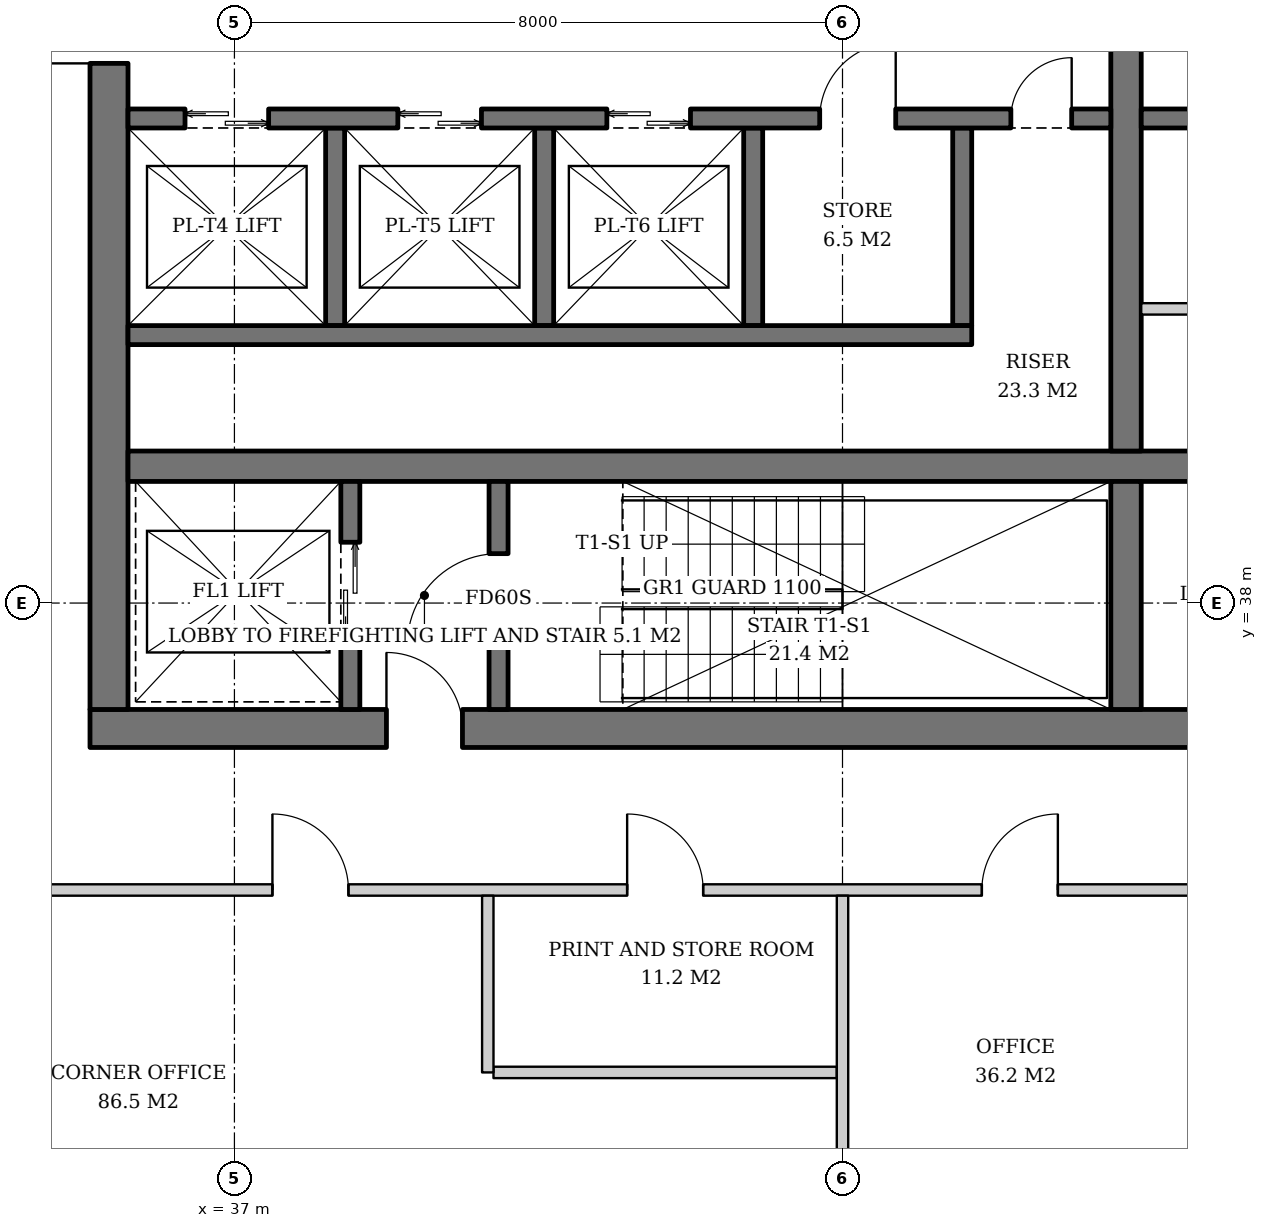
"""IFC4 building model, lengths in metres.
Left out: names, types, materials, properties, quantities, classifications, styles, units other than length and angle.
Written with IfcOpenShell. Run it as: python <this file> out.ifc"""

import sys

from ifc_helpers import new_model, si_unit, direction, frame, frame_2d, origin, place, context, subcontext, project, spatial, rectangle, extrude, element, fill, save


model = new_model("IFC4")
c1 = context("Model", 3, precision=1e-05, world=origin(), true_north=direction((0.0, 1.0)))
c2 = subcontext(c1, "Body", "Model", "MODEL_VIEW")
j1 = project(units=[si_unit("LENGTHUNIT", "METRE"), si_unit("PLANEANGLEUNIT", "RADIAN")], contexts=[c1])
p1 = place(None, origin())
s1 = spatial("IfcSite", under=j1, at=p1, CompositionType="ELEMENT")
p2 = place(p1, origin())
s2 = spatial("IfcBuilding", under=s1, at=p2, CompositionType="ELEMENT")
p3 = place(p2, frame((0.0, 0.0, 271.8)))
s3 = spatial("IfcBuildingStorey", under=s2, at=p3, CompositionType="ELEMENT", Elevation=271.8)
p4 = place(p3, frame((35.1, 36.35, 0.0), z_axis=(0.0, 0.0, 1.0), x_axis=(1.0, 0.0, 0.0)))
e1 = element("IfcWall", 1, at=p4, inside=s3, PredefinedType="SHEAR", context=c2, shape_type="SweptSolid", body=[
    extrude(rectangle(XDim=19.8, YDim=0.5, at=frame_2d((9.9, 0.0))), origin(), (0.0, 0.0, 1.0), 3.8),
])
p5 = place(p4, frame((3.9, 0.0, 0.0)))
e2 = element("IfcOpeningElement", 2, at=p5, cuts=e1, PredefinedType="OPENING", context=c2, shape_type="SweptSolid", body=[
    extrude(rectangle(XDim=1.0, YDim=2.1, at=frame_2d((0.5, 1.05))), frame((0.0, 0.26, 0.0), z_axis=(0.0, -1.0, 0.0), x_axis=(1.0, 0.0, 0.0)), (0.0, 0.0, 1.0), 0.52),
])
p6 = place(p4, frame((15.35, 0.0, 0.0)))
e3 = element("IfcOpeningElement", 3, at=p6, cuts=e1, PredefinedType="OPENING", context=c2, shape_type="SweptSolid", body=[
    extrude(rectangle(XDim=1.0, YDim=2.1, at=frame_2d((0.5, 1.05))), frame((0.0, 0.26, 0.0), z_axis=(0.0, -1.0, 0.0), x_axis=(1.0, 0.0, 0.0)), (0.0, 0.0, 1.0), 0.52),
])
p7 = place(p3, frame((35.35, 36.6, 0.0), z_axis=(0.0, 0.0, 1.0), x_axis=(0.0, 1.0, 0.0)))
e4 = element("IfcWall", 4, at=p7, inside=s3, PredefinedType="SHEAR", context=c2, shape_type="SweptSolid", body=[
    extrude(rectangle(XDim=18.8, YDim=0.5, at=frame_2d((9.4, 0.0))), origin(), (0.0, 0.0, 1.0), 3.8),
])
p8 = place(p7, frame((8.5, 0.0, 0.0)))
e5 = element("IfcOpeningElement", 5, at=p8, cuts=e4, PredefinedType="OPENING", context=c2, shape_type="SweptSolid", body=[
    extrude(rectangle(XDim=1.8, YDim=2.4, at=frame_2d((0.9, 1.2))), frame((0.0, 0.26, 0.0), z_axis=(0.0, -1.0, 0.0), x_axis=(1.0, 0.0, 0.0)), (0.0, 0.0, 1.0), 0.52),
])
p9 = place(p3, frame((35.6, 39.8, 0.0), z_axis=(0.0, 0.0, 1.0), x_axis=(1.0, 0.0, 0.0)))
e6 = element("IfcWall", 6, at=p9, inside=s3, PredefinedType="SHEAR", context=c2, shape_type="SweptSolid", body=[
    extrude(rectangle(XDim=18.8, YDim=0.4, at=frame_2d((9.4, 0.0))), origin(), (0.0, 0.0, 1.0), 3.8),
])
p10 = place(p3, frame((48.73, 36.6, 0.0), z_axis=(0.0, 0.0, 1.0), x_axis=(0.0, 1.0, 0.0)))
e7 = element("IfcWall", 7, at=p10, inside=s3, PredefinedType="SHEAR", context=c2, shape_type="SweptSolid", body=[
    extrude(rectangle(XDim=3.0, YDim=0.4, at=frame_2d((1.5, 0.0))), origin(), (0.0, 0.0, 1.0), 3.8),
])
p11 = place(p3, frame((48.73, 40.0, 0.0), z_axis=(0.0, 0.0, 1.0), x_axis=(0.0, 1.0, 0.0)))
e8 = element("IfcWall", 8, at=p11, inside=s3, PredefinedType="SHEAR", context=c2, shape_type="SweptSolid", body=[
    extrude(rectangle(XDim=12.0, YDim=0.4, at=frame_2d((6.0, 0.0))), origin(), (0.0, 0.0, 1.0), 3.8),
])
p12 = place(p3, frame((38.525, 36.6, 0.0), z_axis=(0.0, 0.0, 1.0), x_axis=(0.0, 1.0, 0.0)))
e9 = element("IfcWall", 9, at=p12, inside=s3, PredefinedType="SHEAR", context=c2, shape_type="SweptSolid", body=[
    extrude(rectangle(XDim=3.0, YDim=0.25, at=frame_2d((1.5, 0.0))), origin(), (0.0, 0.0, 1.0), 3.8),
])
p13 = place(p12, frame((0.9, 0.0, 0.0)))
e10 = element("IfcOpeningElement", 10, at=p13, cuts=e9, PredefinedType="OPENING", context=c2, shape_type="SweptSolid", body=[
    extrude(rectangle(XDim=1.3, YDim=2.2, at=frame_2d((0.65, 1.1))), frame((0.0, 0.135, 0.0), z_axis=(0.0, -1.0, 0.0), x_axis=(1.0, 0.0, 0.0)), (0.0, 0.0, 1.0), 0.27),
])
p14 = place(p3, frame((40.475, 36.6, 0.0), z_axis=(0.0, 0.0, 1.0), x_axis=(0.0, 1.0, 0.0)))
e11 = element("IfcWall", 11, at=p14, inside=s3, PredefinedType="SHEAR", context=c2, shape_type="SweptSolid", body=[
    extrude(rectangle(XDim=3.0, YDim=0.25, at=frame_2d((1.5, 0.0))), origin(), (0.0, 0.0, 1.0), 3.8),
])
p15 = place(p14, frame((0.85, 0.0, 0.0)))
e12 = element("IfcOpeningElement", 12, at=p15, cuts=e11, PredefinedType="OPENING", context=c2, shape_type="SweptSolid", body=[
    extrude(rectangle(XDim=1.2, YDim=2.1, at=frame_2d((0.6, 1.05))), frame((0.0, 0.135, 0.0), z_axis=(0.0, -1.0, 0.0), x_axis=(1.0, 0.0, 0.0)), (0.0, 0.0, 1.0), 0.27),
])
for number, where, z_axis, x_axis in (
    (13, (38.325, 44.25, 0.0), (0.0, 0.0, 1.0), (0.0, -1.0, 0.0)),
    (14, (41.075, 44.25, 0.0), (0.0, 0.0, 1.0), (0.0, -1.0, 0.0)),
    (15, (43.825, 44.25, 0.0), (0.0, 0.0, 1.0), (0.0, -1.0, 0.0)),
    (16, (46.575, 44.25, 0.0), (0.0, 0.0, 1.0), (0.0, -1.0, 0.0)),
):
    element("IfcWall", number, at=place(p3, frame(where, z_axis=z_axis, x_axis=x_axis)), inside=s3, PredefinedType="SHEAR", context=c2, shape_type="SweptSolid", body=[
        extrude(rectangle(XDim=2.6, YDim=0.25, at=frame_2d((1.3, 0.0))), origin(), (0.0, 0.0, 1.0), 3.8),
    ])
p16 = place(p3, frame((35.6, 41.525, 0.0), z_axis=(0.0, 0.0, 1.0), x_axis=(1.0, 0.0, 0.0)))
e17 = element("IfcWall", 17, at=p16, inside=s3, PredefinedType="SHEAR", context=c2, shape_type="SweptSolid", body=[
    extrude(rectangle(XDim=11.1, YDim=0.25, at=frame_2d((5.55, 0.0))), origin(), (0.0, 0.0, 1.0), 3.8),
])
p17 = place(p3, frame((35.6, 44.375, 0.0), z_axis=(0.0, 0.0, 1.0), x_axis=(1.0, 0.0, 0.0)))
e18 = element("IfcWall", 18, at=p17, inside=s3, PredefinedType="SHEAR", context=c2, shape_type="SweptSolid", body=[
    extrude(rectangle(XDim=12.93, YDim=0.25, at=frame_2d((6.465, 0.0))), origin(), (0.0, 0.0, 1.0), 3.8),
])
p18 = place(p17, frame((0.75, 0.0, 0.0)))
e19 = element("IfcOpeningElement", 19, at=p18, cuts=e18, PredefinedType="OPENING", context=c2, shape_type="SweptSolid", body=[
    extrude(rectangle(XDim=1.1, YDim=2.2, at=frame_2d((0.55, 1.1))), frame((0.0, 0.135, 0.0), z_axis=(0.0, -1.0, 0.0), x_axis=(1.0, 0.0, 0.0)), (0.0, 0.0, 1.0), 0.27),
])
p19 = place(p17, frame((3.55, 0.0, 0.0)))
e20 = element("IfcOpeningElement", 20, at=p19, cuts=e18, PredefinedType="OPENING", context=c2, shape_type="SweptSolid", body=[
    extrude(rectangle(XDim=1.1, YDim=2.2, at=frame_2d((0.55, 1.1))), frame((0.0, 0.135, 0.0), z_axis=(0.0, -1.0, 0.0), x_axis=(1.0, 0.0, 0.0)), (0.0, 0.0, 1.0), 0.27),
])
p20 = place(p17, frame((6.3, 0.0, 0.0)))
e21 = element("IfcOpeningElement", 21, at=p20, cuts=e18, PredefinedType="OPENING", context=c2, shape_type="SweptSolid", body=[
    extrude(rectangle(XDim=1.1, YDim=2.2, at=frame_2d((0.55, 1.1))), frame((0.0, 0.135, 0.0), z_axis=(0.0, -1.0, 0.0), x_axis=(1.0, 0.0, 0.0)), (0.0, 0.0, 1.0), 0.27),
])
p21 = place(p17, frame((9.1, 0.0, 0.0)))
e22 = element("IfcOpeningElement", 22, at=p21, cuts=e18, PredefinedType="OPENING", context=c2, shape_type="SweptSolid", body=[
    extrude(rectangle(XDim=1.0, YDim=2.1, at=frame_2d((0.5, 1.05))), frame((0.0, 0.135, 0.0), z_axis=(0.0, -1.0, 0.0), x_axis=(1.0, 0.0, 0.0)), (0.0, 0.0, 1.0), 0.27),
])
p22 = place(p17, frame((11.615, 0.0, 0.0)))
e23 = element("IfcOpeningElement", 23, at=p22, cuts=e18, PredefinedType="OPENING", context=c2, shape_type="SweptSolid", body=[
    extrude(rectangle(XDim=0.8, YDim=2.0, at=frame_2d((0.4, 1.0))), frame((0.0, 0.135, 0.0), z_axis=(0.0, -1.0, 0.0), x_axis=(1.0, 0.0, 0.0)), (0.0, 0.0, 1.0), 0.27),
])
p23 = place(p3, frame((48.93, 44.375, 0.0), z_axis=(0.0, 0.0, 1.0), x_axis=(1.0, 0.0, 0.0)))
e24 = element("IfcWall", 24, at=p23, inside=s3, PredefinedType="SHEAR", context=c2, shape_type="SweptSolid", body=[
    extrude(rectangle(XDim=5.47, YDim=0.25, at=frame_2d((2.735, 0.0))), origin(), (0.0, 0.0, 1.0), 3.8),
])
p24 = place(p23, frame((0.78, 0.0, 0.0)))
e25 = element("IfcOpeningElement", 25, at=p24, cuts=e24, PredefinedType="OPENING", context=c2, shape_type="SweptSolid", body=[
    extrude(rectangle(XDim=1.0, YDim=2.1, at=frame_2d((0.5, 1.05))), frame((0.0, 0.135, 0.0), z_axis=(0.0, -1.0, 0.0), x_axis=(1.0, 0.0, 0.0)), (0.0, 0.0, 1.0), 0.27),
])
p25 = place(p23, frame((3.64, 0.0, 0.0)))
e26 = element("IfcOpeningElement", 26, at=p25, cuts=e24, PredefinedType="OPENING", context=c2, shape_type="SweptSolid", body=[
    extrude(rectangle(XDim=1.0, YDim=2.1, at=frame_2d((0.5, 1.05))), frame((0.0, 0.135, 0.0), z_axis=(0.0, -1.0, 0.0), x_axis=(1.0, 0.0, 0.0)), (0.0, 0.0, 1.0), 0.27),
])
p26 = place(p3, frame((48.93, 41.87, 0.0), z_axis=(0.0, 0.0, 1.0), x_axis=(1.0, 0.0, 0.0)))
e27 = element("IfcWall", 27, at=p26, inside=s3, PredefinedType="SOLIDWALL", context=c2, shape_type="SweptSolid", body=[
    extrude(rectangle(XDim=2.56, YDim=0.15, at=frame_2d((1.28, 0.0))), origin(), (0.0, 0.0, 1.0), 3.62),
])
p27 = place(p26, frame((0.78, 0.0, 0.0)))
e28 = element("IfcOpeningElement", 28, at=p27, cuts=e27, PredefinedType="OPENING", context=c2, shape_type="SweptSolid", body=[
    extrude(rectangle(XDim=1.0, YDim=2.1, at=frame_2d((0.5, 1.05))), frame((0.0, 0.085, 0.0), z_axis=(0.0, -1.0, 0.0), x_axis=(1.0, 0.0, 0.0)), (0.0, 0.0, 1.0), 0.17),
])
p28 = place(p3, frame((40.408, 31.825, 0.0), z_axis=(0.0, 0.0, 1.0), x_axis=(1.0, 0.0, 0.0)))
e29 = element("IfcWall", 29, at=p28, inside=s3, PredefinedType="PARTITIONING", context=c2, shape_type="SweptSolid", body=[
    extrude(rectangle(XDim=4.517, YDim=0.15, at=frame_2d((2.258, 0.0))), origin(), (0.0, 0.0, 1.0), 3.12),
])
p29 = place(p3, frame((34.084, 34.225, 0.0), z_axis=(0.0, 0.0, 1.0), x_axis=(1.0, 0.0, 0.0)))
e30 = element("IfcWall", 30, at=p29, inside=s3, PredefinedType="PARTITIONING", context=c2, shape_type="SweptSolid", body=[
    extrude(rectangle(XDim=21.832, YDim=0.15, at=frame_2d((10.916, 0.0))), origin(), (0.0, 0.0, 1.0), 3.02),
])
p30 = place(p29, frame((3.416, 0.0, 0.0)))
e31 = element("IfcOpeningElement", 31, at=p30, cuts=e30, PredefinedType="OPENING", context=c2, shape_type="SweptSolid", body=[
    extrude(rectangle(XDim=1.0, YDim=2.1, at=frame_2d((0.5, 1.05))), frame((0.0, 0.085, 0.0), z_axis=(0.0, -1.0, 0.0), x_axis=(1.0, 0.0, 0.0)), (0.0, 0.0, 1.0), 0.17),
])
p31 = place(p29, frame((8.083, 0.0, 0.0)))
e32 = element("IfcOpeningElement", 32, at=p31, cuts=e30, PredefinedType="OPENING", context=c2, shape_type="SweptSolid", body=[
    extrude(rectangle(XDim=1.0, YDim=2.1, at=frame_2d((0.5, 1.05))), frame((0.0, 0.085, 0.0), z_axis=(0.0, -1.0, 0.0), x_axis=(1.0, 0.0, 0.0)), (0.0, 0.0, 1.0), 0.17),
])
p32 = place(p29, frame((12.749, 0.0, 0.0)))
e33 = element("IfcOpeningElement", 33, at=p32, cuts=e30, PredefinedType="OPENING", context=c2, shape_type="SweptSolid", body=[
    extrude(rectangle(XDim=1.0, YDim=2.1, at=frame_2d((0.5, 1.05))), frame((0.0, 0.085, 0.0), z_axis=(0.0, -1.0, 0.0), x_axis=(1.0, 0.0, 0.0)), (0.0, 0.0, 1.0), 0.17),
])
p33 = place(p29, frame((17.416, 0.0, 0.0)))
e34 = element("IfcOpeningElement", 34, at=p33, cuts=e30, PredefinedType="OPENING", context=c2, shape_type="SweptSolid", body=[
    extrude(rectangle(XDim=1.0, YDim=2.1, at=frame_2d((0.5, 1.05))), frame((0.0, 0.085, 0.0), z_axis=(0.0, -1.0, 0.0), x_axis=(1.0, 0.0, 0.0)), (0.0, 0.0, 1.0), 0.17),
])
p34 = place(p3, frame((40.333, 34.15, 0.0), z_axis=(0.0, 0.0, 1.0), x_axis=(0.0, -1.0, 0.0)))
e35 = element("IfcWall", 35, at=p34, inside=s3, PredefinedType="PARTITIONING", context=c2, shape_type="SweptSolid", body=[
    extrude(rectangle(XDim=2.325, YDim=0.15, at=frame_2d((1.163, 0.0))), origin(), (0.0, 0.0, 1.0), 3.62),
])
p35 = place(p3, frame((45.0, 34.15, 0.0), z_axis=(0.0, 0.0, 1.0), x_axis=(0.0, -1.0, 0.0)))
e36 = element("IfcWall", 36, at=p35, inside=s3, PredefinedType="PARTITIONING", context=c2, shape_type="SweptSolid", body=[
    extrude(rectangle(XDim=5.19, YDim=0.15, at=frame_2d((2.595, 0.0))), origin(), (0.0, 0.0, 1.0), 3.12),
])
p36 = place(p13, origin())
e37 = element("IfcDoor", 37, at=p36, inside=s3, OperationType="DOUBLE_DOOR_SLIDING", PredefinedType="DOOR", context=c2, shape_type="SweptSolid", body=[
    extrude(rectangle(XDim=1.3, YDim=2.2, at=frame_2d((0.65, 1.1))), frame((0.0, 0.025, 0.0), z_axis=(0.0, -1.0, 0.0), x_axis=(1.0, 0.0, 0.0)), (0.0, 0.0, 1.0), 0.05),
])
fill(e10, e37)
p37 = place(p15, origin())
e38 = element("IfcDoor", 38, at=p37, inside=s3, OperationType="SINGLE_SWING_LEFT", PredefinedType="DOOR", context=c2, shape_type="SweptSolid", body=[
    extrude(rectangle(XDim=1.2, YDim=2.1, at=frame_2d((0.6, 1.05))), frame((0.0, 0.025, 0.0), z_axis=(0.0, -1.0, 0.0), x_axis=(1.0, 0.0, 0.0)), (0.0, 0.0, 1.0), 0.05),
])
fill(e12, e38)
p38 = place(p18, origin())
e39 = element("IfcDoor", 39, at=p38, inside=s3, OperationType="DOUBLE_DOOR_SLIDING", PredefinedType="DOOR", context=c2, shape_type="SweptSolid", body=[
    extrude(rectangle(XDim=1.1, YDim=2.2, at=frame_2d((0.55, 1.1))), frame((0.0, 0.025, 0.0), z_axis=(0.0, -1.0, 0.0), x_axis=(1.0, 0.0, 0.0)), (0.0, 0.0, 1.0), 0.05),
])
fill(e19, e39)
p39 = place(p19, origin())
e40 = element("IfcDoor", 40, at=p39, inside=s3, OperationType="DOUBLE_DOOR_SLIDING", PredefinedType="DOOR", context=c2, shape_type="SweptSolid", body=[
    extrude(rectangle(XDim=1.1, YDim=2.2, at=frame_2d((0.55, 1.1))), frame((0.0, 0.025, 0.0), z_axis=(0.0, -1.0, 0.0), x_axis=(1.0, 0.0, 0.0)), (0.0, 0.0, 1.0), 0.05),
])
fill(e20, e40)
p40 = place(p20, origin())
e41 = element("IfcDoor", 41, at=p40, inside=s3, OperationType="DOUBLE_DOOR_SLIDING", PredefinedType="DOOR", context=c2, shape_type="SweptSolid", body=[
    extrude(rectangle(XDim=1.1, YDim=2.2, at=frame_2d((0.55, 1.1))), frame((0.0, 0.025, 0.0), z_axis=(0.0, -1.0, 0.0), x_axis=(1.0, 0.0, 0.0)), (0.0, 0.0, 1.0), 0.05),
])
fill(e21, e41)
p41 = place(p21, origin())
e42 = element("IfcDoor", 42, at=p41, inside=s3, OperationType="SINGLE_SWING_RIGHT", PredefinedType="DOOR", context=c2, shape_type="SweptSolid", body=[
    extrude(rectangle(XDim=1.0, YDim=2.1, at=frame_2d((0.5, 1.05))), frame((0.0, 0.025, 0.0), z_axis=(0.0, -1.0, 0.0), x_axis=(1.0, 0.0, 0.0)), (0.0, 0.0, 1.0), 0.05),
])
fill(e22, e42)
p42 = place(p22, origin())
e43 = element("IfcDoor", 43, at=p42, inside=s3, OperationType="SINGLE_SWING_RIGHT", PredefinedType="DOOR", context=c2, shape_type="SweptSolid", body=[
    extrude(rectangle(XDim=0.8, YDim=2.0, at=frame_2d((0.4, 1.0))), frame((0.0, 0.025, 0.0), z_axis=(0.0, -1.0, 0.0), x_axis=(1.0, 0.0, 0.0)), (0.0, 0.0, 1.0), 0.05),
])
fill(e23, e43)
p43 = place(p5, origin())
e44 = element("IfcDoor", 44, at=p43, inside=s3, OperationType="SINGLE_SWING_LEFT", PredefinedType="DOOR", context=c2, shape_type="SweptSolid", body=[
    extrude(rectangle(XDim=1.0, YDim=2.1, at=frame_2d((0.5, 1.05))), frame((0.0, 0.025, 0.0), z_axis=(0.0, -1.0, 0.0), x_axis=(1.0, 0.0, 0.0)), (0.0, 0.0, 1.0), 0.05),
])
fill(e2, e44)
p44 = place(p8, origin())
e45 = element("IfcDoor", 45, at=p44, inside=s3, OperationType="DOUBLE_DOOR_SINGLE_SWING", PredefinedType="DOOR", context=c2, shape_type="SweptSolid", body=[
    extrude(rectangle(XDim=1.8, YDim=2.4, at=frame_2d((0.9, 1.2))), frame((0.0, 0.025, 0.0), z_axis=(0.0, -1.0, 0.0), x_axis=(1.0, 0.0, 0.0)), (0.0, 0.0, 1.0), 0.05),
])
fill(e5, e45)
p45 = place(p30, origin())
e46 = element("IfcDoor", 46, at=p45, inside=s3, OperationType="SINGLE_SWING_LEFT", PredefinedType="DOOR", context=c2, shape_type="SweptSolid", body=[
    extrude(rectangle(XDim=1.0, YDim=2.1, at=frame_2d((0.5, 1.05))), frame((0.0, 0.025, 0.0), z_axis=(0.0, -1.0, 0.0), x_axis=(1.0, 0.0, 0.0)), (0.0, 0.0, 1.0), 0.05),
])
fill(e31, e46)
p46 = place(p31, origin())
e47 = element("IfcDoor", 47, at=p46, inside=s3, OperationType="SINGLE_SWING_LEFT", PredefinedType="DOOR", context=c2, shape_type="SweptSolid", body=[
    extrude(rectangle(XDim=1.0, YDim=2.1, at=frame_2d((0.5, 1.05))), frame((0.0, 0.025, 0.0), z_axis=(0.0, -1.0, 0.0), x_axis=(1.0, 0.0, 0.0)), (0.0, 0.0, 1.0), 0.05),
])
fill(e32, e47)
p47 = place(p32, origin())
e48 = element("IfcDoor", 48, at=p47, inside=s3, OperationType="SINGLE_SWING_RIGHT", PredefinedType="DOOR", context=c2, shape_type="SweptSolid", body=[
    extrude(rectangle(XDim=1.0, YDim=2.1, at=frame_2d((0.5, 1.05))), frame((0.0, 0.025, 0.0), z_axis=(0.0, -1.0, 0.0), x_axis=(1.0, 0.0, 0.0)), (0.0, 0.0, 1.0), 0.05),
])
fill(e33, e48)
save(model, sys.argv[1])
